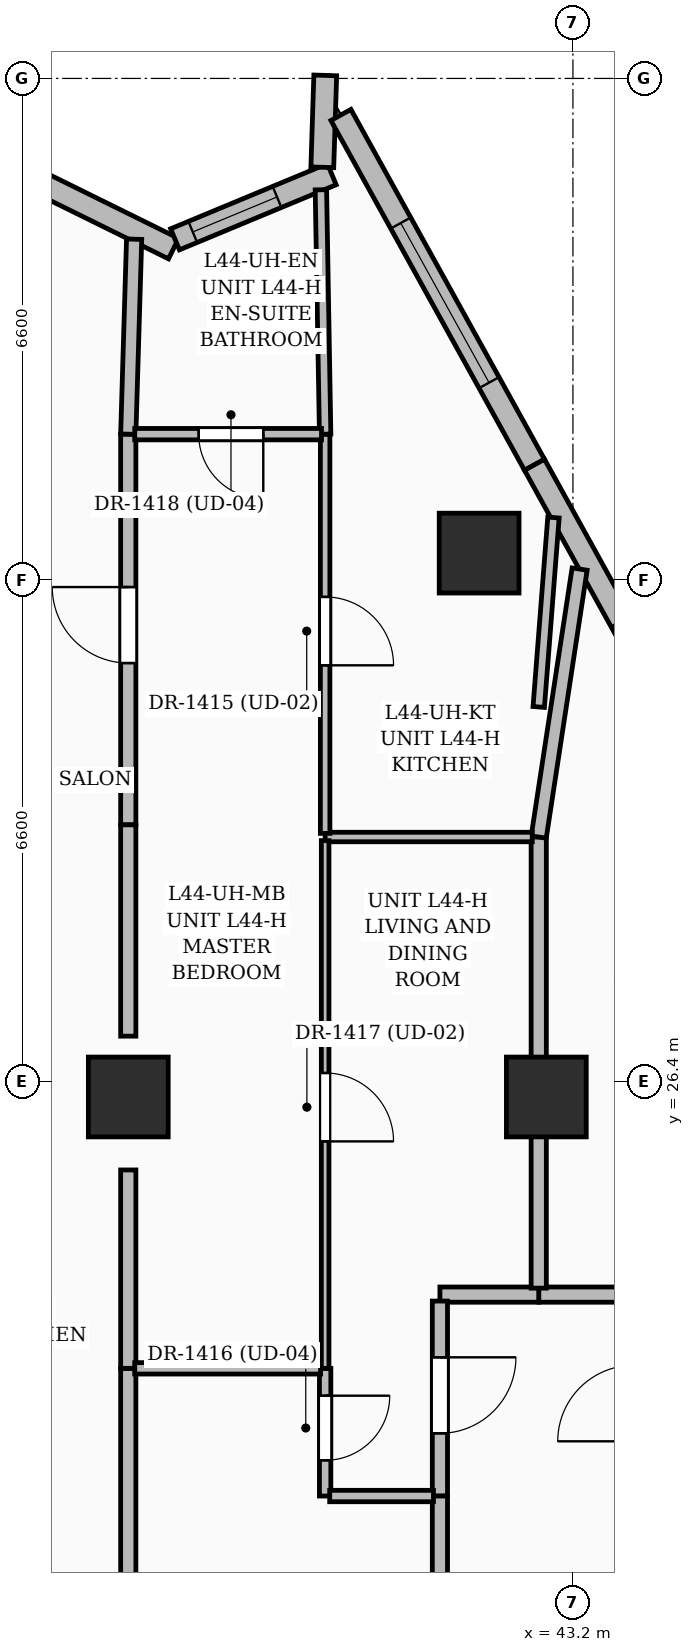
"""IFC4 building model, lengths in metres.
Left out: names, types, materials, properties, quantities, classifications, styles, units other than length and angle.
Written with IfcOpenShell. Run it as: python <this file> out.ifc"""

import sys

from ifc_helpers import new_model, si_unit, direction, frame, frame_2d, origin, origin_2d, place, context, subcontext, project, spatial, rectangle, extrude, element, fill, save


model = new_model("IFC4")
c1 = context("Model", 3, precision=1e-05, world=origin(), true_north=direction((0.0, 1.0)))
c2 = subcontext(c1, "Body", "Model", "MODEL_VIEW")
j1 = project(units=[si_unit("LENGTHUNIT", "METRE"), si_unit("PLANEANGLEUNIT", "RADIAN")], contexts=[c1])
p1 = place(None, origin())
s1 = spatial("IfcSite", under=j1, at=p1, CompositionType="ELEMENT")
p2 = place(p1, origin())
s2 = spatial("IfcBuilding", under=s1, at=p2, CompositionType="ELEMENT")
p3 = place(p2, frame((0.0, 0.0, 171.6)))
s3 = spatial("IfcBuildingStorey", under=s2, at=p3, CompositionType="ELEMENT", Elevation=171.6)
for number, where, z_axis, x_axis in (
    (1, (42.85, 26.2, 0.0), (0.0, 0.0, 1.0), (1.0, 0.0, 0.0)),
    (2, (37.35, 26.2, 0.0), (0.0, 0.0, 1.0), (1.0, 0.0, 0.0)),
    (3, (41.966, 33.355, 0.0), (0.0, 0.0, 1.0), (1.0, 0.0, 0.0)),
):
    element("IfcColumn", number, at=place(p3, frame(where, z_axis=z_axis, x_axis=x_axis)), inside=s3, PredefinedType="COLUMN", context=c2, shape_type="SweptSolid", body=[
        extrude(rectangle(XDim=1.05, YDim=1.05, at=origin_2d()), origin(), (0.0, 0.0, 1.0), 3.6),
    ])
p4 = place(p3, frame((35.928, 38.356, 0.0), z_axis=(0.0, 0.0, 1.0), x_axis=(0.896845505116, -0.442343915922, 0.0)))
e4 = element("IfcWall", 4, at=p4, inside=s3, PredefinedType="SOLIDWALL", context=c2, shape_type="SweptSolid", body=[
    extrude(rectangle(XDim=2.249, YDim=0.3, at=frame_2d((1.125, 0.0))), origin(), (0.0, 0.0, 1.0), 3.35),
])
p5 = place(p3, frame((37.965, 37.483, 0.0), z_axis=(0.0, 0.0, 1.0), x_axis=(0.923525911383, 0.383536036123, 0.0)))
e5 = element("IfcWall", 5, at=p5, inside=s3, PredefinedType="SOLIDWALL", context=c2, shape_type="SweptSolid", body=[
    extrude(rectangle(XDim=2.233, YDim=0.3, at=frame_2d((1.116, 0.0))), origin(), (0.0, 0.0, 1.0), 3.35),
])
p6 = place(p5, frame((0.253, 0.0, 0.8)))
e6 = element("IfcOpeningElement", 6, at=p6, cuts=e5, PredefinedType="OPENING", context=c2, shape_type="SweptSolid", body=[
    extrude(rectangle(XDim=1.2, YDim=1.8, at=frame_2d((0.6, 0.9))), frame((0.0, 0.16, 0.0), z_axis=(0.0, -1.0, 0.0), x_axis=(1.0, 0.0, 0.0)), (0.0, 0.0, 1.0), 0.32),
])
p7 = place(p3, frame((39.903, 38.431, 0.0), z_axis=(0.0, 0.0, 1.0), x_axis=(0.032091701063, 0.999484928712, 0.0)))
e7 = element("IfcWall", 7, at=p7, inside=s3, PredefinedType="SOLIDWALL", context=c2, shape_type="SweptSolid", body=[
    extrude(rectangle(XDim=1.21, YDim=0.3, at=frame_2d((0.605, 0.0))), origin(), (0.0, 0.0, 1.0), 3.35),
])
p8 = place(p3, frame((40.148, 39.119, 0.0), z_axis=(0.0, 0.0, 1.0), x_axis=(0.484195973422, -0.874959575822, 0.0)))
e8 = element("IfcWall", 8, at=p8, inside=s3, PredefinedType="SOLIDWALL", context=c2, shape_type="SweptSolid", body=[
    extrude(rectangle(XDim=5.26, YDim=0.3, at=frame_2d((2.63, 0.0))), origin(), (0.0, 0.0, 1.0), 3.35),
])
p9 = place(p8, frame((1.625, 0.0, 0.6)))
e9 = element("IfcOpeningElement", 9, at=p9, cuts=e8, PredefinedType="OPENING", context=c2, shape_type="SweptSolid", body=[
    extrude(rectangle(XDim=2.4, YDim=2.1, at=frame_2d((1.2, 1.05))), frame((0.0, 0.16, 0.0), z_axis=(0.0, -1.0, 0.0), x_axis=(1.0, 0.0, 0.0)), (0.0, 0.0, 1.0), 0.32),
])
p10 = place(p3, frame((42.695, 34.517, 0.0), z_axis=(0.0, 0.0, 1.0), x_axis=(0.484178621325, -0.874969178115, 0.0)))
e10 = element("IfcWall", 10, at=p10, inside=s3, PredefinedType="SOLIDWALL", context=c2, shape_type="SweptSolid", body=[
    extrude(rectangle(XDim=5.835, YDim=0.3, at=frame_2d((2.917, 0.0))), origin(), (0.0, 0.0, 1.0), 3.35),
])
p11 = place(p10, frame((2.35, 0.0, 0.55)))
e11 = element("IfcOpeningElement", 11, at=p11, cuts=e10, PredefinedType="OPENING", context=c2, shape_type="SweptSolid", body=[
    extrude(rectangle(XDim=2.1, YDim=2.4, at=frame_2d((1.05, 1.2))), frame((0.0, 0.16, 0.0), z_axis=(0.0, -1.0, 0.0), x_axis=(1.0, 0.0, 0.0)), (0.0, 0.0, 1.0), 0.32),
])
p12 = place(p3, frame((43.915, 23.6, 0.0), z_axis=(0.0, 0.0, 1.0), x_axis=(-1.0, 0.0, 0.0)))
e12 = element("IfcWall", 12, at=p12, inside=s3, PredefinedType="PARTITIONING", context=c2, shape_type="SweptSolid", body=[
    extrude(rectangle(XDim=1.165, YDim=0.2, at=frame_2d((0.583, 0.0))), origin(), (0.0, 0.0, 1.0), 2.436),
])
p13 = place(p3, frame((42.75, 23.6, 0.0), z_axis=(0.0, 0.0, 1.0), x_axis=(-1.0, 0.0, 0.0)))
e13 = element("IfcWall", 13, at=p13, inside=s3, PredefinedType="PARTITIONING", context=c2, shape_type="SweptSolid", body=[
    extrude(rectangle(XDim=1.3, YDim=0.2, at=frame_2d((0.65, 0.0))), origin(), (0.0, 0.0, 1.0), 3.35),
])
p14 = place(p3, frame((41.45, 23.515, 0.0), z_axis=(0.0, 0.0, 1.0), x_axis=(0.0, -1.0, 0.0)))
e14 = element("IfcWall", 14, at=p14, inside=s3, PredefinedType="PARTITIONING", context=c2, shape_type="SweptSolid", body=[
    extrude(rectangle(XDim=2.565, YDim=0.2, at=frame_2d((1.282, 0.0))), origin(), (0.0, 0.0, 1.0), 3.35),
])
p15 = place(p14, frame((0.74, 0.0, 0.0)))
e15 = element("IfcOpeningElement", 15, at=p15, cuts=e14, PredefinedType="OPENING", context=c2, shape_type="SweptSolid", body=[
    extrude(rectangle(XDim=1.0, YDim=2.2, at=frame_2d((0.5, 1.1))), frame((0.0, 0.11, 0.0), z_axis=(0.0, -1.0, 0.0), x_axis=(1.0, 0.0, 0.0)), (0.0, 0.0, 1.0), 0.22),
])
p16 = place(p3, frame((41.45, 20.95, 0.0), z_axis=(0.0, 0.0, 1.0), x_axis=(0.0, -1.0, 0.0)))
e16 = element("IfcWall", 16, at=p16, inside=s3, PredefinedType="PARTITIONING", context=c2, shape_type="SweptSolid", body=[
    extrude(rectangle(XDim=3.2, YDim=0.2, at=frame_2d((1.6, 0.0))), origin(), (0.0, 0.0, 1.0), 3.35),
])
p17 = place(p3, frame((37.35, 17.835, 0.0), z_axis=(0.0, 0.0, 1.0), x_axis=(0.0, 1.0, 0.0)))
e17 = element("IfcWall", 17, at=p17, inside=s3, PredefinedType="PARTITIONING", context=c2, shape_type="SweptSolid", body=[
    extrude(rectangle(XDim=4.795, YDim=0.2, at=frame_2d((2.397, 0.0))), origin(), (0.0, 0.0, 1.0), 3.35),
])
p18 = place(p3, frame((37.35, 22.63, 0.0), z_axis=(0.0, 0.0, 1.0), x_axis=(0.0, 1.0, 0.0)))
e18 = element("IfcWall", 18, at=p18, inside=s3, PredefinedType="PARTITIONING", context=c2, shape_type="SweptSolid", body=[
    extrude(rectangle(XDim=2.61, YDim=0.2, at=frame_2d((1.305, 0.0))), origin(), (0.0, 0.0, 1.0), 3.35),
])
p19 = place(p3, frame((42.75, 29.62, 0.0), z_axis=(0.0, 0.0, 1.0), x_axis=(0.0, -1.0, 0.0)))
e19 = element("IfcWall", 19, at=p19, inside=s3, PredefinedType="PARTITIONING", context=c2, shape_type="SweptSolid", body=[
    extrude(rectangle(XDim=5.935, YDim=0.2, at=frame_2d((2.968, 0.0))), origin(), (0.0, 0.0, 1.0), 1.12),
])
p20 = place(p3, frame((43.288, 33.145, 0.0), z_axis=(0.0, 0.0, 1.0), x_axis=(-0.150904593609, -0.988548331458, 0.0)))
e20 = element("IfcWall", 20, at=p20, inside=s3, PredefinedType="PARTITIONING", context=c2, shape_type="SweptSolid", body=[
    extrude(rectangle(XDim=3.566, YDim=0.2, at=frame_2d((1.783, 0.0))), origin(), (0.0, 0.0, 1.0), 1.12),
])
p21 = place(p3, frame((37.35, 29.78, 0.0), z_axis=(0.0, 0.0, 1.0), x_axis=(0.0, 1.0, 0.0)))
e21 = element("IfcWall", 21, at=p21, inside=s3, PredefinedType="PARTITIONING", context=c2, shape_type="SweptSolid", body=[
    extrude(rectangle(XDim=5.14, YDim=0.2, at=frame_2d((2.57, 0.0))), origin(), (0.0, 0.0, 1.0), 2.57),
])
p22 = place(p21, frame((2.128, 0.0, 0.0)))
e22 = element("IfcOpeningElement", 22, at=p22, cuts=e21, PredefinedType="OPENING", context=c2, shape_type="SweptSolid", body=[
    extrude(rectangle(XDim=1.0, YDim=2.2, at=frame_2d((0.5, 1.1))), frame((0.0, 0.11, 0.0), z_axis=(0.0, -1.0, 0.0), x_axis=(1.0, 0.0, 0.0)), (0.0, 0.0, 1.0), 0.22),
])
p23 = place(p3, frame((37.35, 34.92, 0.0), z_axis=(0.0, 0.0, 1.0), x_axis=(0.029966549364, 0.999550902115, 0.0)))
e23 = element("IfcWall", 23, at=p23, inside=s3, PredefinedType="PARTITIONING", context=c2, shape_type="SweptSolid", body=[
    extrude(rectangle(XDim=2.566, YDim=0.2, at=frame_2d((1.283, 0.0))), origin(), (0.0, 0.0, 1.0), 3.35),
])
p24 = place(p3, frame((37.35, 27.0, 0.0), z_axis=(0.0, 0.0, 1.0), x_axis=(0.0, 1.0, 0.0)))
e24 = element("IfcWall", 24, at=p24, inside=s3, PredefinedType="PARTITIONING", context=c2, shape_type="SweptSolid", body=[
    extrude(rectangle(XDim=2.78, YDim=0.2, at=frame_2d((1.39, 0.0))), origin(), (0.0, 0.0, 1.0), 1.12),
])
p25 = place(p3, frame((39.94, 22.63, 0.0), z_axis=(0.0, 0.0, 1.0), x_axis=(0.0, -1.0, 0.0)))
e25 = element("IfcWall", 25, at=p25, inside=s3, PredefinedType="PARTITIONING", context=c2, shape_type="SweptSolid", body=[
    extrude(rectangle(XDim=1.68, YDim=0.15, at=frame_2d((0.84, 0.0))), origin(), (0.0, 0.0, 1.0), 3.35),
])
p26 = place(p25, frame((0.36, 0.0, 0.0)))
e26 = element("IfcOpeningElement", 26, at=p26, cuts=e25, PredefinedType="OPENING", context=c2, shape_type="SweptSolid", body=[
    extrude(rectangle(XDim=0.85, YDim=2.1, at=frame_2d((0.425, 1.05))), frame((0.0, 0.085, 0.0), z_axis=(0.0, -1.0, 0.0), x_axis=(1.0, 0.0, 0.0)), (0.0, 0.0, 1.0), 0.17),
])
p27 = place(p3, frame((40.0, 20.95, 0.0), z_axis=(0.0, 0.0, 1.0), x_axis=(1.0, 0.0, 0.0)))
e27 = element("IfcWall", 27, at=p27, inside=s3, PredefinedType="PARTITIONING", context=c2, shape_type="SweptSolid", body=[
    extrude(rectangle(XDim=1.365, YDim=0.15, at=frame_2d((0.683, 0.0))), origin(), (0.0, 0.0, 1.0), 3.35),
])
p28 = place(p3, frame((42.665, 29.62, 0.0), z_axis=(0.0, 0.0, 1.0), x_axis=(-1.0, 0.0, 0.0)))
e28 = element("IfcWall", 28, at=p28, inside=s3, PredefinedType="PARTITIONING", context=c2, shape_type="SweptSolid", body=[
    extrude(rectangle(XDim=2.725, YDim=0.125, at=frame_2d((1.363, 0.0))), origin(), (0.0, 0.0, 1.0), 1.12),
])
p29 = place(p3, frame((39.94, 29.573, 0.0), z_axis=(0.0, 0.0, 1.0), x_axis=(0.0, -1.0, 0.0)))
e29 = element("IfcWall", 29, at=p29, inside=s3, PredefinedType="PARTITIONING", context=c2, shape_type="SweptSolid", body=[
    extrude(rectangle(XDim=6.943, YDim=0.1, at=frame_2d((3.471, 0.0))), origin(), (0.0, 0.0, 1.0), 2.37),
])
p30 = place(p29, frame((3.057, 0.0, 0.0)))
e30 = element("IfcOpeningElement", 30, at=p30, cuts=e29, PredefinedType="OPENING", context=c2, shape_type="SweptSolid", body=[
    extrude(rectangle(XDim=0.9, YDim=2.15, at=frame_2d((0.45, 1.075))), frame((0.0, 0.06, 0.0), z_axis=(0.0, -1.0, 0.0), x_axis=(1.0, 0.0, 0.0)), (0.0, 0.0, 1.0), 0.12),
])
p31 = place(p3, frame((39.88, 22.63, 0.0), z_axis=(0.0, 0.0, 1.0), x_axis=(-1.0, 0.0, 0.0)))
e31 = element("IfcWall", 31, at=p31, inside=s3, PredefinedType="PARTITIONING", context=c2, shape_type="SweptSolid", body=[
    extrude(rectangle(XDim=2.445, YDim=0.15, at=frame_2d((1.222, 0.0))), origin(), (0.0, 0.0, 1.0), 3.35),
])
p32 = place(p3, frame((39.94, 34.92, 0.0), z_axis=(0.0, 0.0, 1.0), x_axis=(0.0, -1.0, 0.0)))
e32 = element("IfcWall", 32, at=p32, inside=s3, PredefinedType="PARTITIONING", context=c2, shape_type="SweptSolid", body=[
    extrude(rectangle(XDim=5.252, YDim=0.125, at=frame_2d((2.626, 0.0))), origin(), (0.0, 0.0, 1.0), 2.57),
])
p33 = place(p32, frame((2.141, 0.0, 0.0)))
e33 = element("IfcOpeningElement", 33, at=p33, cuts=e32, PredefinedType="OPENING", context=c2, shape_type="SweptSolid", body=[
    extrude(rectangle(XDim=0.9, YDim=2.15, at=frame_2d((0.45, 1.075))), frame((0.0, 0.072, 0.0), z_axis=(0.0, -1.0, 0.0), x_axis=(1.0, 0.0, 0.0)), (0.0, 0.0, 1.0), 0.145),
])
p34 = place(p3, frame((39.884, 38.135, 0.0), z_axis=(0.0, 0.0, 1.0), x_axis=(0.017310793211, -0.999850156993, 0.0)))
e34 = element("IfcWall", 34, at=p34, inside=s3, PredefinedType="PARTITIONING", context=c2, shape_type="SweptSolid", body=[
    extrude(rectangle(XDim=3.216, YDim=0.15, at=frame_2d((1.608, 0.0))), origin(), (0.0, 0.0, 1.0), 3.35),
])
p35 = place(p3, frame((39.893, 34.92, 0.0), z_axis=(0.0, 0.0, 1.0), x_axis=(-1.0, 0.0, 0.0)))
e35 = element("IfcWall", 35, at=p35, inside=s3, PredefinedType="PARTITIONING", context=c2, shape_type="SweptSolid", body=[
    extrude(rectangle(XDim=2.458, YDim=0.15, at=frame_2d((1.229, 0.0))), origin(), (0.0, 0.0, 1.0), 3.35),
])
p36 = place(p35, frame((0.766, 0.0, 0.0)))
e36 = element("IfcOpeningElement", 36, at=p36, cuts=e35, PredefinedType="OPENING", context=c2, shape_type="SweptSolid", body=[
    extrude(rectangle(XDim=0.85, YDim=2.1, at=frame_2d((0.425, 1.05))), frame((0.0, 0.085, 0.0), z_axis=(0.0, -1.0, 0.0), x_axis=(1.0, 0.0, 0.0)), (0.0, 0.0, 1.0), 0.17),
])
p37 = place(p3, frame((42.944, 33.823, 0.0), z_axis=(0.0, 0.0, 1.0), x_axis=(-0.077652540781, -0.996980482713, 0.0)))
e37 = element("IfcWall", 37, at=p37, inside=s3, PredefinedType="PARTITIONING", context=c2, shape_type="SweptSolid", body=[
    extrude(rectangle(XDim=2.5, YDim=0.15, at=frame_2d((1.25, 0.0))), origin(), (0.0, 0.0, 1.0), 1.12),
])
p38 = place(p6, origin())
e38 = element("IfcWindow", 38, at=p38, inside=s3, PartitioningType="SINGLE_PANEL", PredefinedType="WINDOW", context=c2, shape_type="SweptSolid", body=[
    extrude(rectangle(XDim=1.2, YDim=1.8, at=frame_2d((0.6, 0.9))), frame((0.0, 0.03, 0.0), z_axis=(0.0, -1.0, 0.0), x_axis=(1.0, 0.0, 0.0)), (0.0, 0.0, 1.0), 0.06),
])
fill(e6, e38)
p39 = place(p9, origin())
e39 = element("IfcWindow", 39, at=p39, inside=s3, PartitioningType="SINGLE_PANEL", PredefinedType="WINDOW", context=c2, shape_type="SweptSolid", body=[
    extrude(rectangle(XDim=2.4, YDim=2.1, at=frame_2d((1.2, 1.05))), frame((0.0, 0.03, 0.0), z_axis=(0.0, -1.0, 0.0), x_axis=(1.0, 0.0, 0.0)), (0.0, 0.0, 1.0), 0.06),
])
fill(e9, e39)
p40 = place(p15, origin())
e40 = element("IfcDoor", 40, at=p40, inside=s3, OperationType="SINGLE_SWING_LEFT", PredefinedType="DOOR", context=c2, shape_type="SweptSolid", body=[
    extrude(rectangle(XDim=1.0, YDim=2.2, at=frame_2d((0.5, 1.1))), frame((0.0, 0.025, 0.0), z_axis=(0.0, -1.0, 0.0), x_axis=(1.0, 0.0, 0.0)), (0.0, 0.0, 1.0), 0.05),
])
fill(e15, e40)
p41 = place(p33, origin())
e41 = element("IfcDoor", 41, at=p41, inside=s3, OperationType="SINGLE_SWING_RIGHT", PredefinedType="DOOR", context=c2, shape_type="SweptSolid", body=[
    extrude(rectangle(XDim=0.9, YDim=2.15, at=frame_2d((0.45, 1.075))), frame((0.0, 0.025, 0.0), z_axis=(0.0, -1.0, 0.0), x_axis=(1.0, 0.0, 0.0)), (0.0, 0.0, 1.0), 0.05),
])
fill(e33, e41)
p42 = place(p26, origin())
e42 = element("IfcDoor", 42, at=p42, inside=s3, OperationType="SINGLE_SWING_LEFT", PredefinedType="DOOR", context=c2, shape_type="SweptSolid", body=[
    extrude(rectangle(XDim=0.85, YDim=2.1, at=frame_2d((0.425, 1.05))), frame((0.0, 0.025, 0.0), z_axis=(0.0, -1.0, 0.0), x_axis=(1.0, 0.0, 0.0)), (0.0, 0.0, 1.0), 0.05),
])
fill(e26, e42)
p43 = place(p30, origin())
e43 = element("IfcDoor", 43, at=p43, inside=s3, OperationType="SINGLE_SWING_RIGHT", PredefinedType="DOOR", context=c2, shape_type="SweptSolid", body=[
    extrude(rectangle(XDim=0.9, YDim=2.15, at=frame_2d((0.45, 1.075))), frame((0.0, 0.025, 0.0), z_axis=(0.0, -1.0, 0.0), x_axis=(1.0, 0.0, 0.0)), (0.0, 0.0, 1.0), 0.05),
])
fill(e30, e43)
p44 = place(p36, origin())
e44 = element("IfcDoor", 44, at=p44, inside=s3, OperationType="SINGLE_SWING_LEFT", PredefinedType="DOOR", context=c2, shape_type="SweptSolid", body=[
    extrude(rectangle(XDim=0.85, YDim=2.1, at=frame_2d((0.425, 1.05))), frame((0.0, 0.025, 0.0), z_axis=(0.0, -1.0, 0.0), x_axis=(1.0, 0.0, 0.0)), (0.0, 0.0, 1.0), 0.05),
])
fill(e36, e44)
p45 = place(p22, origin())
e45 = element("IfcDoor", 45, at=p45, inside=s3, OperationType="SINGLE_SWING_RIGHT", PredefinedType="DOOR", context=c2, shape_type="SweptSolid", body=[
    extrude(rectangle(XDim=1.0, YDim=2.2, at=frame_2d((0.5, 1.1))), frame((0.0, 0.025, 0.0), z_axis=(0.0, -1.0, 0.0), x_axis=(1.0, 0.0, 0.0)), (0.0, 0.0, 1.0), 0.05),
])
fill(e22, e45)
save(model, sys.argv[1])
